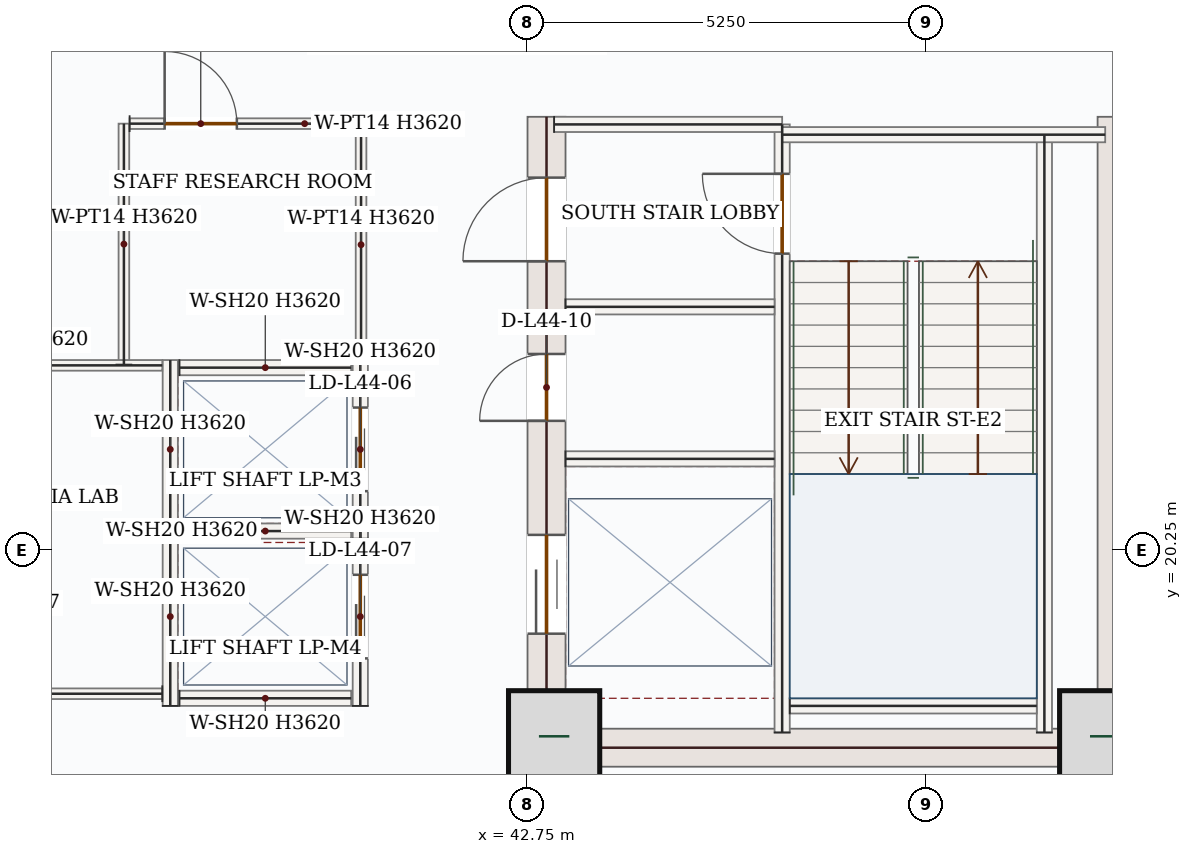
"""IFC4 building model, lengths in metres.
Left out: names, types, materials, properties, quantities, classifications, styles, units other than length and angle.
Written with IfcOpenShell. Run it as: python <this file> out.ifc"""

import sys

from ifc_helpers import new_model, si_unit, direction, frame, frame_2d, origin, origin_2d, place, context, subcontext, project, spatial, rectangle, extrude, source, transform, mapped, element, fill, save


model = new_model("IFC4")
c1 = context("Model", 3, precision=1e-05, world=origin(), true_north=direction((0.0, 1.0)))
c2 = subcontext(c1, "Body", "Model", "MODEL_VIEW")
j1 = project(units=[si_unit("LENGTHUNIT", "METRE"), si_unit("PLANEANGLEUNIT", "RADIAN")], contexts=[c1])
p1 = place(None, origin())
s1 = spatial("IfcSite", under=j1, at=p1, CompositionType="ELEMENT")
p2 = place(p1, origin())
s2 = spatial("IfcBuilding", under=s1, at=p2, CompositionType="ELEMENT")
p3 = place(p2, frame((0.0, 0.0, 190.2)))
s3 = spatial("IfcBuildingStorey", under=s2, at=p3, CompositionType="ELEMENT", Elevation=190.2)
p4 = place(p3, frame((43.0, 17.4, 0.0), z_axis=(0.0, 0.0, 1.0), x_axis=(0.0, 1.0, 0.0)))
e1 = element("IfcWall", 1, at=p4, inside=s3, PredefinedType="SHEAR", context=c2, shape_type="SweptSolid", body=[
    extrude(rectangle(XDim=8.55, YDim=0.5, at=frame_2d((4.275, 0.0))), origin(), (0.0, 0.0, 1.0), 3.62),
])
p5 = place(p4, frame((6.65, 0.0, 0.0)))
e2 = element("IfcOpeningElement", 2, at=p5, cuts=e1, PredefinedType="OPENING", context=c2, shape_type="SweptSolid", body=[
    extrude(rectangle(XDim=1.1, YDim=2.2, at=frame_2d((0.55, 1.1))), frame((0.0, 0.26, 0.0), z_axis=(0.0, -1.0, 0.0), x_axis=(1.0, 0.0, 0.0)), (0.0, 0.0, 1.0), 0.52),
])
p6 = place(p4, frame((1.75, 0.0, 0.0)))
e3 = element("IfcOpeningElement", 3, at=p6, cuts=e1, PredefinedType="OPENING", context=c2, shape_type="SweptSolid", body=[
    extrude(rectangle(XDim=1.3, YDim=2.2, at=frame_2d((0.65, 1.1))), frame((0.0, 0.26, 0.0), z_axis=(0.0, -1.0, 0.0), x_axis=(1.0, 0.0, 0.0)), (0.0, 0.0, 1.0), 0.52),
])
p7 = place(p4, frame((4.55, 0.0, 0.0)))
e4 = element("IfcOpeningElement", 4, at=p7, cuts=e1, PredefinedType="OPENING", context=c2, shape_type="SweptSolid", body=[
    extrude(rectangle(XDim=0.88, YDim=2.1, at=frame_2d((0.44, 1.05))), frame((0.0, 0.26, 0.0), z_axis=(0.0, -1.0, 0.0), x_axis=(1.0, 0.0, 0.0)), (0.0, 0.0, 1.0), 0.52),
])
m1 = source(origin(), c2, "Body", "SweptSolid", [
    extrude(rectangle(XDim=8.55, YDim=0.5, at=frame_2d((4.275, 0.0))), origin(), (0.0, 0.0, 1.0), 3.62),
])
p8 = place(p3, frame((50.5, 17.4, 0.0), z_axis=(0.0, 0.0, 1.0), x_axis=(0.0, 1.0, 0.0)))
e5 = element("IfcWall", 5, at=p8, inside=s3, PredefinedType="SHEAR", context=c2, shape_type="MappedRepresentation", body=[
    mapped(m1, transform((0.0, 0.0, 0.0), x_axis=(1.0, 0.0, 0.0), y_axis=(0.0, 1.0, 0.0), z_axis=(0.0, 0.0, 1.0), scale=1.0)),
])
m2 = source(origin(), c2, "Body", "SweptSolid", [
    extrude(rectangle(XDim=7.0, YDim=0.5, at=frame_2d((3.5, 0.0))), origin(), (0.0, 0.0, 1.0), 3.62),
])
p9 = place(p3, frame((43.25, 17.65, 0.0), z_axis=(0.0, 0.0, 1.0), x_axis=(1.0, 0.0, 0.0)))
e6 = element("IfcWall", 6, at=p9, inside=s3, PredefinedType="SHEAR", context=c2, shape_type="MappedRepresentation", body=[
    mapped(m2, transform((0.0, 0.0, 0.0), x_axis=(1.0, 0.0, 0.0), y_axis=(0.0, 1.0, 0.0), z_axis=(0.0, 0.0, 1.0), scale=1.0)),
])
m3 = source(origin(), c2, "Body", "SweptSolid", [
    extrude(rectangle(XDim=1.2, YDim=1.2, at=origin_2d()), origin(), (0.0, 0.0, 1.0), 3.9),
])
for number, where, z_axis, x_axis in (
    (7, (43.1, 17.8, 0.0), (0.0, 0.0, 1.0), (1.0, 0.0, 0.0)),
    (8, (50.35, 17.8, 0.0), (0.0, 0.0, 1.0), (1.0, 0.0, 0.0)),
):
    element("IfcColumn", number, at=place(p3, frame(where, z_axis=z_axis, x_axis=x_axis)), inside=s3, PredefinedType="COLUMN", context=c2, shape_type="MappedRepresentation", body=[
        mapped(m3, transform((0.0, 0.0, 0.0), x_axis=(1.0, 0.0, 0.0), y_axis=(0.0, 1.0, 0.0), z_axis=(0.0, 0.0, 1.0), scale=1.0)),
    ])
p10 = place(p3, frame((53.06, 18.458, 0.0), z_axis=(0.0, 0.0, 1.0), x_axis=(-0.707106781187, -0.707106781187, 0.0)))
e9 = element("IfcWall", 9, at=p10, inside=s3, PredefinedType="SOLIDWALL", context=c2, shape_type="SweptSolid", body=[
    extrude(rectangle(XDim=5.258, YDim=0.28, at=frame_2d((2.629, 0.0))), origin(), (0.0, 0.0, 1.0), 3.62),
])
p11 = place(p10, frame((1.729, 0.0, 0.85)))
e10 = element("IfcOpeningElement", 10, at=p11, cuts=e9, PredefinedType="OPENING", context=c2, shape_type="SweptSolid", body=[
    extrude(rectangle(XDim=1.8, YDim=1.75, at=frame_2d((0.9, 0.875))), frame((0.0, 0.15, 0.0), z_axis=(0.0, -1.0, 0.0), x_axis=(1.0, 0.0, 0.0)), (0.0, 0.0, 1.0), 0.3),
])
m4 = source(origin(), c2, "Body", "SweptSolid", [
    extrude(rectangle(XDim=7.87, YDim=0.2, at=frame_2d((3.935, 0.0))), origin(), (0.0, 0.0, 1.0), 3.62),
])
p12 = place(p3, frame((49.55, 17.85, 0.0), z_axis=(0.0, 0.0, 1.0), x_axis=(0.0, 1.0, 0.0)))
e11 = element("IfcWall", 11, at=p12, inside=s3, PredefinedType="SOLIDWALL", context=c2, shape_type="MappedRepresentation", body=[
    mapped(m4, transform((0.0, 0.0, 0.0), x_axis=(1.0, 0.0, 0.0), y_axis=(0.0, 1.0, 0.0), z_axis=(0.0, 0.0, 1.0), scale=1.0)),
])
p13 = place(p3, frame((46.1, 17.85, 0.0), z_axis=(0.0, 0.0, 1.0), x_axis=(0.0, 1.0, 0.0)))
e12 = element("IfcWall", 12, at=p13, inside=s3, PredefinedType="SOLIDWALL", context=c2, shape_type="SweptSolid", body=[
    extrude(rectangle(XDim=8.0, YDim=0.2, at=frame_2d((4.0, 0.0))), origin(), (0.0, 0.0, 1.0), 3.62),
])
p14 = place(p13, frame((6.3, 0.0, 0.0)))
e13 = element("IfcOpeningElement", 13, at=p14, cuts=e12, PredefinedType="OPENING", context=c2, shape_type="SweptSolid", body=[
    extrude(rectangle(XDim=1.05, YDim=2.15, at=frame_2d((0.525, 1.075))), frame((0.0, 0.11, 0.0), z_axis=(0.0, -1.0, 0.0), x_axis=(1.0, 0.0, 0.0)), (0.0, 0.0, 1.0), 0.22),
])
m5 = source(origin(), c2, "Body", "SweptSolid", [
    extrude(rectangle(XDim=3.0, YDim=0.2, at=frame_2d((1.5, 0.0))), origin(), (0.0, 0.0, 1.0), 3.62),
])
p15 = place(p3, frame((43.1, 25.85, 0.0), z_axis=(0.0, 0.0, 1.0), x_axis=(1.0, 0.0, 0.0)))
e14 = element("IfcWall", 14, at=p15, inside=s3, PredefinedType="SOLIDWALL", context=c2, shape_type="MappedRepresentation", body=[
    mapped(m5, transform((0.0, 0.0, 0.0), x_axis=(1.0, 0.0, 0.0), y_axis=(0.0, 1.0, 0.0), z_axis=(0.0, 0.0, 1.0), scale=1.0)),
])
m6 = source(origin(), c2, "Body", "SweptSolid", [
    extrude(rectangle(XDim=4.25, YDim=0.2, at=frame_2d((2.125, 0.0))), origin(), (0.0, 0.0, 1.0), 3.62),
])
p16 = place(p3, frame((46.1, 25.715, 0.0), z_axis=(0.0, 0.0, 1.0), x_axis=(1.0, 0.0, 0.0)))
e15 = element("IfcWall", 15, at=p16, inside=s3, PredefinedType="SOLIDWALL", context=c2, shape_type="MappedRepresentation", body=[
    mapped(m6, transform((0.0, 0.0, 0.0), x_axis=(1.0, 0.0, 0.0), y_axis=(0.0, 1.0, 0.0), z_axis=(0.0, 0.0, 1.0), scale=1.0)),
])
m7 = source(origin(), c2, "Body", "SweptSolid", [
    extrude(rectangle(XDim=3.25, YDim=0.2, at=frame_2d((1.625, 0.0))), origin(), (0.0, 0.0, 1.0), 3.62),
])
p17 = place(p3, frame((46.2, 18.2, 0.0), z_axis=(0.0, 0.0, 1.0), x_axis=(1.0, 0.0, 0.0)))
e16 = element("IfcWall", 16, at=p17, inside=s3, PredefinedType="SOLIDWALL", context=c2, shape_type="MappedRepresentation", body=[
    mapped(m7, transform((0.0, 0.0, 0.0), x_axis=(1.0, 0.0, 0.0), y_axis=(0.0, 1.0, 0.0), z_axis=(0.0, 0.0, 1.0), scale=1.0)),
])
m8 = source(origin(), c2, "Body", "SweptSolid", [
    extrude(rectangle(XDim=2.75, YDim=0.2, at=frame_2d((1.375, 0.0))), origin(), (0.0, 0.0, 1.0), 3.62),
])
for number, where, z_axis, x_axis in (
    (17, (43.25, 23.45, 0.0), (0.0, 0.0, 1.0), (1.0, 0.0, 0.0)),
    (18, (43.25, 21.45, 0.0), (0.0, 0.0, 1.0), (1.0, 0.0, 0.0)),
):
    element("IfcWall", number, at=place(p3, frame(where, z_axis=z_axis, x_axis=x_axis)), inside=s3, PredefinedType="SOLIDWALL", context=c2, shape_type="MappedRepresentation", body=[
        mapped(m8, transform((0.0, 0.0, 0.0), x_axis=(1.0, 0.0, 0.0), y_axis=(0.0, 1.0, 0.0), z_axis=(0.0, 0.0, 1.0), scale=1.0)),
    ])
m9 = source(origin(), c2, "Body", "SweptSolid", [
    extrude(rectangle(XDim=2.35, YDim=0.2, at=frame_2d((1.175, 0.0))), origin(), (0.0, 0.0, 1.0), 3.62),
])
p18 = place(p3, frame((38.05, 20.4, 0.0), z_axis=(0.0, 0.0, 1.0), x_axis=(0.0, 1.0, 0.0)))
e19 = element("IfcWall", 19, at=p18, inside=s3, PredefinedType="SOLIDWALL", context=c2, shape_type="MappedRepresentation", body=[
    mapped(m9, transform((0.0, 0.0, 0.0), x_axis=(1.0, 0.0, 0.0), y_axis=(0.0, 1.0, 0.0), z_axis=(0.0, 0.0, 1.0), scale=1.0)),
])
p19 = place(p3, frame((40.55, 20.4, 0.0), z_axis=(0.0, 0.0, 1.0), x_axis=(0.0, 1.0, 0.0)))
e20 = element("IfcWall", 20, at=p19, inside=s3, PredefinedType="SOLIDWALL", context=c2, shape_type="SweptSolid", body=[
    extrude(rectangle(XDim=2.35, YDim=0.2, at=frame_2d((1.175, 0.0))), origin(), (0.0, 0.0, 1.0), 3.62),
])
p20 = place(p19, frame((0.625, 0.0, 0.0)))
e21 = element("IfcOpeningElement", 21, at=p20, cuts=e20, PredefinedType="OPENING", context=c2, shape_type="SweptSolid", body=[
    extrude(rectangle(XDim=1.1, YDim=2.15, at=frame_2d((0.55, 1.075))), frame((0.0, 0.11, 0.0), z_axis=(0.0, -1.0, 0.0), x_axis=(1.0, 0.0, 0.0)), (0.0, 0.0, 1.0), 0.22),
])
m10 = source(origin(), c2, "Body", "SweptSolid", [
    extrude(rectangle(XDim=2.26, YDim=0.2, at=frame_2d((1.13, 0.0))), origin(), (0.0, 0.0, 1.0), 3.62),
])
for number, where, z_axis, x_axis in (
    (22, (38.17, 20.5, 0.0), (0.0, 0.0, 1.0), (1.0, 0.0, 0.0)),
    (23, (38.17, 22.65, 0.0), (0.0, 0.0, 1.0), (1.0, 0.0, 0.0)),
):
    element("IfcWall", number, at=place(p3, frame(where, z_axis=z_axis, x_axis=x_axis)), inside=s3, PredefinedType="SOLIDWALL", context=c2, shape_type="MappedRepresentation", body=[
        mapped(m10, transform((0.0, 0.0, 0.0), x_axis=(1.0, 0.0, 0.0), y_axis=(0.0, 1.0, 0.0), z_axis=(0.0, 0.0, 1.0), scale=1.0)),
    ])
p21 = place(p3, frame((38.05, 18.2, 0.0), z_axis=(0.0, 0.0, 1.0), x_axis=(0.0, 1.0, 0.0)))
e24 = element("IfcWall", 24, at=p21, inside=s3, PredefinedType="SOLIDWALL", context=c2, shape_type="MappedRepresentation", body=[
    mapped(m9, transform((0.0, 0.0, 0.0), x_axis=(1.0, 0.0, 0.0), y_axis=(0.0, 1.0, 0.0), z_axis=(0.0, 0.0, 1.0), scale=1.0)),
])
p22 = place(p3, frame((40.55, 18.2, 0.0), z_axis=(0.0, 0.0, 1.0), x_axis=(0.0, 1.0, 0.0)))
e25 = element("IfcWall", 25, at=p22, inside=s3, PredefinedType="SOLIDWALL", context=c2, shape_type="SweptSolid", body=[
    extrude(rectangle(XDim=2.35, YDim=0.2, at=frame_2d((1.175, 0.0))), origin(), (0.0, 0.0, 1.0), 3.62),
])
p23 = place(p22, frame((0.625, 0.0, 0.0)))
e26 = element("IfcOpeningElement", 26, at=p23, cuts=e25, PredefinedType="OPENING", context=c2, shape_type="SweptSolid", body=[
    extrude(rectangle(XDim=1.1, YDim=2.15, at=frame_2d((0.55, 1.075))), frame((0.0, 0.11, 0.0), z_axis=(0.0, -1.0, 0.0), x_axis=(1.0, 0.0, 0.0)), (0.0, 0.0, 1.0), 0.22),
])
p24 = place(p3, frame((38.17, 18.3, 0.0), z_axis=(0.0, 0.0, 1.0), x_axis=(1.0, 0.0, 0.0)))
e27 = element("IfcWall", 27, at=p24, inside=s3, PredefinedType="SOLIDWALL", context=c2, shape_type="MappedRepresentation", body=[
    mapped(m10, transform((0.0, 0.0, 0.0), x_axis=(1.0, 0.0, 0.0), y_axis=(0.0, 1.0, 0.0), z_axis=(0.0, 0.0, 1.0), scale=1.0)),
])
m11 = source(origin(), c2, "Body", "SweptSolid", [
    extrude(rectangle(XDim=3.17, YDim=0.14, at=frame_2d((1.585, 0.0))), origin(), (0.0, 0.0, 1.0), 3.62),
])
p25 = place(p3, frame((37.44, 22.69, 0.0), z_axis=(0.0, 0.0, 1.0), x_axis=(0.0, 1.0, 0.0)))
e28 = element("IfcWall", 28, at=p25, inside=s3, PredefinedType="PARTITIONING", context=c2, shape_type="MappedRepresentation", body=[
    mapped(m11, transform((0.0, 0.0, 0.0), x_axis=(1.0, 0.0, 0.0), y_axis=(0.0, 1.0, 0.0), z_axis=(0.0, 0.0, 1.0), scale=1.0)),
])
p26 = place(p3, frame((37.515, 25.86, 0.0), z_axis=(0.0, 0.0, 1.0), x_axis=(1.0, 0.0, 0.0)))
e29 = element("IfcWall", 29, at=p26, inside=s3, PredefinedType="PARTITIONING", context=c2, shape_type="SweptSolid", body=[
    extrude(rectangle(XDim=3.045, YDim=0.14, at=frame_2d((1.522, 0.0))), origin(), (0.0, 0.0, 1.0), 3.62),
])
p27 = place(p26, frame((0.461, 0.0, 0.0)))
e30 = element("IfcOpeningElement", 30, at=p27, cuts=e29, PredefinedType="OPENING", context=c2, shape_type="SweptSolid", body=[
    extrude(rectangle(XDim=0.95, YDim=2.15, at=frame_2d((0.475, 1.075))), frame((0.0, 0.08, 0.0), z_axis=(0.0, -1.0, 0.0), x_axis=(1.0, 0.0, 0.0)), (0.0, 0.0, 1.0), 0.16),
])
m12 = source(origin(), c2, "Body", "SweptSolid", [
    extrude(rectangle(XDim=3.035, YDim=0.14, at=frame_2d((1.518, 0.0))), origin(), (0.0, 0.0, 1.0), 3.62),
])
p28 = place(p3, frame((40.56, 25.785, 0.0), z_axis=(0.0, 0.0, 1.0), x_axis=(0.0, -1.0, 0.0)))
e31 = element("IfcWall", 31, at=p28, inside=s3, PredefinedType="PARTITIONING", context=c2, shape_type="MappedRepresentation", body=[
    mapped(m12, transform((0.0, 0.0, 0.0), x_axis=(1.0, 0.0, 0.0), y_axis=(0.0, 1.0, 0.0), z_axis=(0.0, 0.0, 1.0), scale=1.0)),
])
m13 = source(origin(), c2, "Body", "SweptSolid", [
    extrude(rectangle(XDim=3.89, YDim=0.14, at=frame_2d((1.945, 0.0))), origin(), (0.0, 0.0, 1.0), 3.62),
])
p29 = place(p3, frame((34.055, 22.68, 0.0), z_axis=(0.0, 0.0, 1.0), x_axis=(1.0, 0.0, 0.0)))
e32 = element("IfcWall", 32, at=p29, inside=s3, PredefinedType="PARTITIONING", context=c2, shape_type="MappedRepresentation", body=[
    mapped(m13, transform((0.0, 0.0, 0.0), x_axis=(1.0, 0.0, 0.0), y_axis=(0.0, 1.0, 0.0), z_axis=(0.0, 0.0, 1.0), scale=1.0)),
])
p30 = place(p3, frame((37.945, 18.36, 0.0), z_axis=(0.0, 0.0, 1.0), x_axis=(-1.0, 0.0, 0.0)))
e33 = element("IfcWall", 33, at=p30, inside=s3, PredefinedType="PARTITIONING", context=c2, shape_type="SweptSolid", body=[
    extrude(rectangle(XDim=3.89, YDim=0.14, at=frame_2d((1.945, 0.0))), origin(), (0.0, 0.0, 1.0), 3.62),
])
p31 = place(p30, frame((1.47, 0.0, 0.0)))
e34 = element("IfcOpeningElement", 34, at=p31, cuts=e33, PredefinedType="OPENING", context=c2, shape_type="SweptSolid", body=[
    extrude(rectangle(XDim=0.95, YDim=2.15, at=frame_2d((0.475, 1.075))), frame((0.0, 0.08, 0.0), z_axis=(0.0, -1.0, 0.0), x_axis=(1.0, 0.0, 0.0)), (0.0, 0.0, 1.0), 0.16),
])
m14 = source(origin(), c2, "Body", "SweptSolid", [
    extrude(rectangle(XDim=1.05, YDim=2.15, at=frame_2d((0.525, 1.075))), frame((0.0, 0.025, 0.0), z_axis=(0.0, -1.0, 0.0), x_axis=(1.0, 0.0, 0.0)), (0.0, 0.0, 1.0), 0.05),
])
p32 = place(p14, origin())
e35 = element("IfcDoor", 35, at=p32, inside=s3, OperationType="SINGLE_SWING_RIGHT", PredefinedType="DOOR", context=c2, shape_type="MappedRepresentation", body=[
    mapped(m14, transform((0.0, 0.0, 0.0), x_axis=(1.0, 0.0, 0.0), y_axis=(0.0, 1.0, 0.0), z_axis=(0.0, 0.0, 1.0), scale=1.0)),
])
fill(e13, e35)
m15 = source(origin(), c2, "Body", "SweptSolid", [
    extrude(rectangle(XDim=1.1, YDim=2.2, at=frame_2d((0.55, 1.1))), frame((0.0, 0.025, 0.0), z_axis=(0.0, -1.0, 0.0), x_axis=(1.0, 0.0, 0.0)), (0.0, 0.0, 1.0), 0.05),
])
p33 = place(p5, origin())
e36 = element("IfcDoor", 36, at=p33, inside=s3, OperationType="SINGLE_SWING_LEFT", PredefinedType="DOOR", context=c2, shape_type="MappedRepresentation", body=[
    mapped(m15, transform((0.0, 0.0, 0.0), x_axis=(1.0, 0.0, 0.0), y_axis=(0.0, 1.0, 0.0), z_axis=(0.0, 0.0, 1.0), scale=1.0)),
])
fill(e2, e36)
m16 = source(origin(), c2, "Body", "SweptSolid", [
    extrude(rectangle(XDim=1.3, YDim=2.2, at=frame_2d((0.65, 1.1))), frame((0.0, 0.025, 0.0), z_axis=(0.0, -1.0, 0.0), x_axis=(1.0, 0.0, 0.0)), (0.0, 0.0, 1.0), 0.05),
])
p34 = place(p6, origin())
e37 = element("IfcDoor", 37, at=p34, inside=s3, OperationType="DOUBLE_DOOR_SLIDING", PredefinedType="DOOR", context=c2, shape_type="MappedRepresentation", body=[
    mapped(m16, transform((0.0, 0.0, 0.0), x_axis=(1.0, 0.0, 0.0), y_axis=(0.0, 1.0, 0.0), z_axis=(0.0, 0.0, 1.0), scale=1.0)),
])
fill(e3, e37)
m17 = source(origin(), c2, "Body", "SweptSolid", [
    extrude(rectangle(XDim=0.88, YDim=2.1, at=frame_2d((0.44, 1.05))), frame((0.0, 0.025, 0.0), z_axis=(0.0, -1.0, 0.0), x_axis=(1.0, 0.0, 0.0)), (0.0, 0.0, 1.0), 0.05),
])
p35 = place(p7, origin())
e38 = element("IfcDoor", 38, at=p35, inside=s3, OperationType="SINGLE_SWING_LEFT", PredefinedType="DOOR", context=c2, shape_type="MappedRepresentation", body=[
    mapped(m17, transform((0.0, 0.0, 0.0), x_axis=(1.0, 0.0, 0.0), y_axis=(0.0, 1.0, 0.0), z_axis=(0.0, 0.0, 1.0), scale=1.0)),
])
fill(e4, e38)
m18 = source(origin(), c2, "Body", "SweptSolid", [
    extrude(rectangle(XDim=1.1, YDim=2.15, at=frame_2d((0.55, 1.075))), frame((0.0, 0.025, 0.0), z_axis=(0.0, -1.0, 0.0), x_axis=(1.0, 0.0, 0.0)), (0.0, 0.0, 1.0), 0.05),
])
p36 = place(p20, origin())
e39 = element("IfcDoor", 39, at=p36, inside=s3, OperationType="DOUBLE_DOOR_SLIDING", PredefinedType="DOOR", context=c2, shape_type="MappedRepresentation", body=[
    mapped(m18, transform((0.0, 0.0, 0.0), x_axis=(1.0, 0.0, 0.0), y_axis=(0.0, 1.0, 0.0), z_axis=(0.0, 0.0, 1.0), scale=1.0)),
])
fill(e21, e39)
p37 = place(p23, origin())
e40 = element("IfcDoor", 40, at=p37, inside=s3, OperationType="DOUBLE_DOOR_SLIDING", PredefinedType="DOOR", context=c2, shape_type="MappedRepresentation", body=[
    mapped(m18, transform((0.0, 0.0, 0.0), x_axis=(1.0, 0.0, 0.0), y_axis=(0.0, 1.0, 0.0), z_axis=(0.0, 0.0, 1.0), scale=1.0)),
])
fill(e26, e40)
m19 = source(origin(), c2, "Body", "SweptSolid", [
    extrude(rectangle(XDim=0.95, YDim=2.15, at=frame_2d((0.475, 1.075))), frame((0.0, 0.025, 0.0), z_axis=(0.0, -1.0, 0.0), x_axis=(1.0, 0.0, 0.0)), (0.0, 0.0, 1.0), 0.05),
])
p38 = place(p27, origin())
e41 = element("IfcDoor", 41, at=p38, inside=s3, OperationType="SINGLE_SWING_LEFT", PredefinedType="DOOR", context=c2, shape_type="MappedRepresentation", body=[
    mapped(m19, transform((0.0, 0.0, 0.0), x_axis=(1.0, 0.0, 0.0), y_axis=(0.0, 1.0, 0.0), z_axis=(0.0, 0.0, 1.0), scale=1.0)),
])
fill(e30, e41)
save(model, sys.argv[1])
